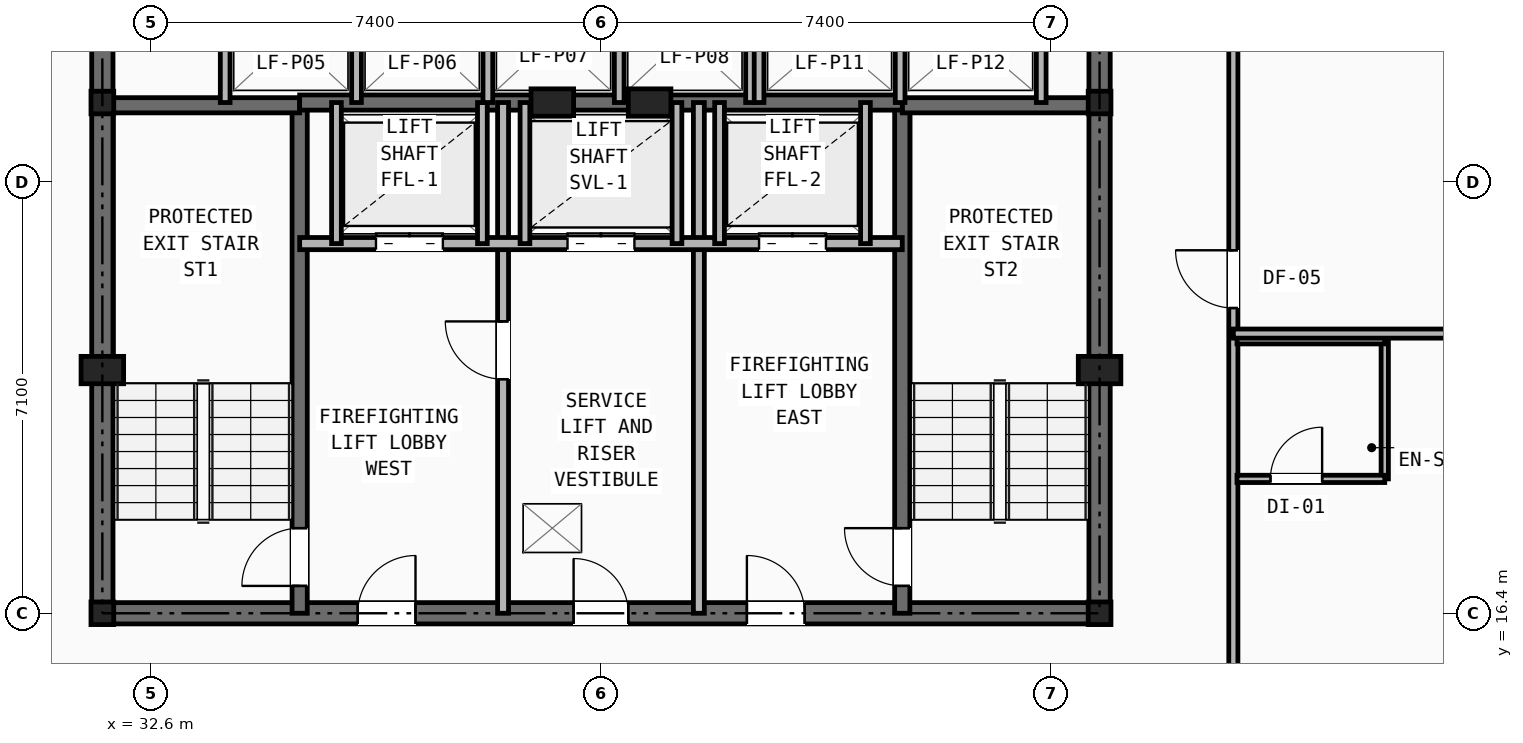
"""IFC4 building model, lengths in metres.
Left out: names, types, materials, properties, quantities, classifications, styles, units other than length and angle.
Written with IfcOpenShell. Run it as: python <this file> out.ifc"""

import sys

from ifc_helpers import new_model, si_unit, direction, frame, frame_2d, origin, origin_2d, place, context, subcontext, project, spatial, rectangle, i_section, extrude, element, fill, save


model = new_model("IFC4")
c1 = context("Model", 3, precision=1e-05, world=origin(), true_north=direction((0.0, 1.0)))
c2 = subcontext(c1, "Body", "Model", "MODEL_VIEW")
j1 = project(units=[si_unit("LENGTHUNIT", "METRE"), si_unit("PLANEANGLEUNIT", "RADIAN")], contexts=[c1])
p1 = place(None, origin())
s1 = spatial("IfcSite", under=j1, at=p1, CompositionType="ELEMENT")
p2 = place(p1, origin())
s2 = spatial("IfcBuilding", under=s1, at=p2, CompositionType="ELEMENT")
p3 = place(p2, frame((0.0, 0.0, 43.2)))
s3 = spatial("IfcBuildingStorey", under=s2, at=p3, CompositionType="ELEMENT", Elevation=43.2)
for number, where, z_axis, x_axis in (
    (1, (31.8, 16.4, 0.0), (0.0, 0.0, 1.0), (1.0, 0.0, 0.0)),
    (2, (48.2, 16.4, 0.0), (0.0, 0.0, 1.0), (1.0, 0.0, 0.0)),
    (3, (31.8, 24.8, 0.0), (0.0, 0.0, 1.0), (1.0, 0.0, 0.0)),
    (4, (48.2, 24.8, 0.0), (0.0, 0.0, 1.0), (1.0, 0.0, 0.0)),
):
    element("IfcColumn", number, at=place(p3, frame(where, z_axis=z_axis, x_axis=x_axis)), inside=s3, PredefinedType="COLUMN", context=c2, shape_type="SweptSolid", body=[
        extrude(i_section(OverallWidth=0.374, OverallDepth=0.372, WebThickness=0.016, FlangeThickness=0.026, at=origin_2d()), origin(), (0.0, 0.0, 1.0), 3.2),
    ])
for number, where, z_axis, x_axis in (
    (5, (31.8, 20.4, 0.0), (0.0, 0.0, 1.0), (1.0, 0.0, 0.0)),
    (6, (48.2, 20.4, 0.0), (0.0, 0.0, 1.0), (1.0, 0.0, 0.0)),
    (7, (39.2, 24.8, 0.0), (0.0, 0.0, 1.0), (1.0, 0.0, 0.0)),
    (8, (40.8, 24.8, 0.0), (0.0, 0.0, 1.0), (1.0, 0.0, 0.0)),
):
    element("IfcColumn", number, at=place(p3, frame(where, z_axis=z_axis, x_axis=x_axis)), inside=s3, PredefinedType="PILASTER", context=c2, shape_type="SweptSolid", body=[
        extrude(rectangle(XDim=0.7, YDim=0.45, at=origin_2d()), origin(), (0.0, 0.0, 1.0), 3.2),
    ])
p4 = place(p3, frame((31.8, 16.4, 0.0), z_axis=(0.0, 0.0, 1.0), x_axis=(1.0, 0.0, 0.0)))
e9 = element("IfcWall", 9, at=p4, inside=s3, PredefinedType="SHEAR", context=c2, shape_type="SweptSolid", body=[
    extrude(rectangle(XDim=16.4, YDim=0.35, at=frame_2d((8.2, 0.0))), origin(), (0.0, 0.0, 1.0), 2.98),
])
p5 = place(p4, frame((7.75, 0.0, 0.0)))
e10 = element("IfcOpeningElement", 10, at=p5, cuts=e9, PredefinedType="OPENING", context=c2, shape_type="SweptSolid", body=[
    extrude(rectangle(XDim=0.9, YDim=2.1, at=frame_2d((0.45, 1.05))), frame((0.0, 0.185, 0.0), z_axis=(0.0, -1.0, 0.0), x_axis=(1.0, 0.0, 0.0)), (0.0, 0.0, 1.0), 0.37),
])
p6 = place(p4, frame((4.2, 0.0, 0.0)))
e11 = element("IfcOpeningElement", 11, at=p6, cuts=e9, PredefinedType="OPENING", context=c2, shape_type="SweptSolid", body=[
    extrude(rectangle(XDim=0.95, YDim=2.1, at=frame_2d((0.475, 1.05))), frame((0.0, 0.185, 0.0), z_axis=(0.0, -1.0, 0.0), x_axis=(1.0, 0.0, 0.0)), (0.0, 0.0, 1.0), 0.37),
])
p7 = place(p4, frame((10.6, 0.0, 0.0)))
e12 = element("IfcOpeningElement", 12, at=p7, cuts=e9, PredefinedType="OPENING", context=c2, shape_type="SweptSolid", body=[
    extrude(rectangle(XDim=0.95, YDim=2.1, at=frame_2d((0.475, 1.05))), frame((0.0, 0.185, 0.0), z_axis=(0.0, -1.0, 0.0), x_axis=(1.0, 0.0, 0.0)), (0.0, 0.0, 1.0), 0.37),
])
p8 = place(p3, frame((31.8, 16.4, 0.0), z_axis=(0.0, 0.0, 1.0), x_axis=(0.0, 1.0, 0.0)))
e13 = element("IfcWall", 13, at=p8, inside=s3, PredefinedType="SHEAR", context=c2, shape_type="SweptSolid", body=[
    extrude(rectangle(XDim=14.8, YDim=0.35, at=frame_2d((7.4, 0.0))), origin(), (0.0, 0.0, 1.0), 2.98),
])
p9 = place(p8, frame((11.0, 0.0, 0.0)))
e14 = element("IfcOpeningElement", 14, at=p9, cuts=e13, PredefinedType="OPENING", context=c2, shape_type="SweptSolid", body=[
    extrude(rectangle(XDim=1.1, YDim=2.15, at=frame_2d((0.55, 1.075))), frame((0.0, 0.185, 0.0), z_axis=(0.0, -1.0, 0.0), x_axis=(1.0, 0.0, 0.0)), (0.0, 0.0, 1.0), 0.37),
])
p10 = place(p3, frame((48.2, 16.4, 0.0), z_axis=(0.0, 0.0, 1.0), x_axis=(0.0, 1.0, 0.0)))
e15 = element("IfcWall", 15, at=p10, inside=s3, PredefinedType="SHEAR", context=c2, shape_type="SweptSolid", body=[
    extrude(rectangle(XDim=14.8, YDim=0.35, at=frame_2d((7.4, 0.0))), origin(), (0.0, 0.0, 1.0), 2.98),
])
p11 = place(p10, frame((11.0, 0.0, 0.0)))
e16 = element("IfcOpeningElement", 16, at=p11, cuts=e15, PredefinedType="OPENING", context=c2, shape_type="SweptSolid", body=[
    extrude(rectangle(XDim=1.1, YDim=2.15, at=frame_2d((0.55, 1.075))), frame((0.0, 0.185, 0.0), z_axis=(0.0, -1.0, 0.0), x_axis=(1.0, 0.0, 0.0)), (0.0, 0.0, 1.0), 0.37),
])
p12 = place(p3, frame((35.045, 16.4, 0.0), z_axis=(0.0, 0.0, 1.0), x_axis=(0.0, 1.0, 0.0)))
e17 = element("IfcWall", 17, at=p12, inside=s3, PredefinedType="SHEAR", context=c2, shape_type="SweptSolid", body=[
    extrude(rectangle(XDim=8.4, YDim=0.25, at=frame_2d((4.2, 0.0))), origin(), (0.0, 0.0, 1.0), 2.98),
])
p13 = place(p12, frame((0.45, 0.0, 0.0)))
e18 = element("IfcOpeningElement", 18, at=p13, cuts=e17, PredefinedType="OPENING", context=c2, shape_type="SweptSolid", body=[
    extrude(rectangle(XDim=0.95, YDim=2.1, at=frame_2d((0.475, 1.05))), frame((0.0, 0.135, 0.0), z_axis=(0.0, -1.0, 0.0), x_axis=(1.0, 0.0, 0.0)), (0.0, 0.0, 1.0), 0.27),
])
p14 = place(p3, frame((31.8, 24.755, 0.0), z_axis=(0.0, 0.0, 1.0), x_axis=(1.0, 0.0, 0.0)))
e19 = element("IfcWall", 19, at=p14, inside=s3, PredefinedType="SHEAR", context=c2, shape_type="SweptSolid", body=[
    extrude(rectangle(XDim=3.245, YDim=0.25, at=frame_2d((1.623, 0.0))), origin(), (0.0, 0.0, 1.0), 2.98),
])
p15 = place(p3, frame((44.955, 16.4, 0.0), z_axis=(0.0, 0.0, 1.0), x_axis=(0.0, 1.0, 0.0)))
e20 = element("IfcWall", 20, at=p15, inside=s3, PredefinedType="SHEAR", context=c2, shape_type="SweptSolid", body=[
    extrude(rectangle(XDim=8.4, YDim=0.25, at=frame_2d((4.2, 0.0))), origin(), (0.0, 0.0, 1.0), 2.98),
])
p16 = place(p15, frame((0.45, 0.0, 0.0)))
e21 = element("IfcOpeningElement", 21, at=p16, cuts=e20, PredefinedType="OPENING", context=c2, shape_type="SweptSolid", body=[
    extrude(rectangle(XDim=0.95, YDim=2.1, at=frame_2d((0.475, 1.05))), frame((0.0, 0.135, 0.0), z_axis=(0.0, -1.0, 0.0), x_axis=(1.0, 0.0, 0.0)), (0.0, 0.0, 1.0), 0.27),
])
p17 = place(p3, frame((44.955, 24.755, 0.0), z_axis=(0.0, 0.0, 1.0), x_axis=(1.0, 0.0, 0.0)))
e22 = element("IfcWall", 22, at=p17, inside=s3, PredefinedType="SHEAR", context=c2, shape_type="SweptSolid", body=[
    extrude(rectangle(XDim=3.245, YDim=0.25, at=frame_2d((1.623, 0.0))), origin(), (0.0, 0.0, 1.0), 2.98),
])
p18 = place(p3, frame((35.045, 24.8, 0.0), z_axis=(0.0, 0.0, 1.0), x_axis=(1.0, 0.0, 0.0)))
e23 = element("IfcWall", 23, at=p18, inside=s3, PredefinedType="SHEAR", context=c2, shape_type="SweptSolid", body=[
    extrude(rectangle(XDim=9.91, YDim=0.25, at=frame_2d((4.955, 0.0))), origin(), (0.0, 0.0, 1.0), 2.98),
])
p19 = place(p3, frame((38.39, 16.4, 0.0), z_axis=(0.0, 0.0, 1.0), x_axis=(0.0, 1.0, 0.0)))
e24 = element("IfcWall", 24, at=p19, inside=s3, PredefinedType="PARTITIONING", context=c2, shape_type="SweptSolid", body=[
    extrude(rectangle(XDim=8.4, YDim=0.18, at=frame_2d((4.2, 0.0))), origin(), (0.0, 0.0, 1.0), 2.431),
])
p20 = place(p19, frame((3.85, 0.0, 0.0)))
e25 = element("IfcOpeningElement", 25, at=p20, cuts=e24, PredefinedType="OPENING", context=c2, shape_type="SweptSolid", body=[
    extrude(rectangle(XDim=0.95, YDim=2.1, at=frame_2d((0.475, 1.05))), frame((0.0, 0.1, 0.0), z_axis=(0.0, -1.0, 0.0), x_axis=(1.0, 0.0, 0.0)), (0.0, 0.0, 1.0), 0.2),
])
p21 = place(p3, frame((41.61, 16.4, 0.0), z_axis=(0.0, 0.0, 1.0), x_axis=(0.0, 1.0, 0.0)))
e26 = element("IfcWall", 26, at=p21, inside=s3, PredefinedType="PARTITIONING", context=c2, shape_type="SweptSolid", body=[
    extrude(rectangle(XDim=8.4, YDim=0.18, at=frame_2d((4.2, 0.0))), origin(), (0.0, 0.0, 1.0), 2.431),
])
p22 = place(p3, frame((35.045, 22.48, 0.0), z_axis=(0.0, 0.0, 1.0), x_axis=(1.0, 0.0, 0.0)))
e27 = element("IfcWall", 27, at=p22, inside=s3, PredefinedType="SOLIDWALL", context=c2, shape_type="SweptSolid", body=[
    extrude(rectangle(XDim=9.91, YDim=0.2, at=frame_2d((4.955, 0.0))), origin(), (0.0, 0.0, 1.0), 2.98),
])
p23 = place(p22, frame((1.255, 0.0, 0.0)))
e28 = element("IfcOpeningElement", 28, at=p23, cuts=e27, PredefinedType="OPENING", context=c2, shape_type="SweptSolid", body=[
    extrude(rectangle(XDim=1.1, YDim=2.15, at=frame_2d((0.55, 1.075))), frame((0.0, 0.11, 0.0), z_axis=(0.0, -1.0, 0.0), x_axis=(1.0, 0.0, 0.0)), (0.0, 0.0, 1.0), 0.22),
])
p24 = place(p22, frame((7.555, 0.0, 0.0)))
e29 = element("IfcOpeningElement", 29, at=p24, cuts=e27, PredefinedType="OPENING", context=c2, shape_type="SweptSolid", body=[
    extrude(rectangle(XDim=1.1, YDim=2.15, at=frame_2d((0.55, 1.075))), frame((0.0, 0.11, 0.0), z_axis=(0.0, -1.0, 0.0), x_axis=(1.0, 0.0, 0.0)), (0.0, 0.0, 1.0), 0.22),
])
p25 = place(p22, frame((4.405, 0.0, 0.0)))
e30 = element("IfcOpeningElement", 30, at=p25, cuts=e27, PredefinedType="OPENING", context=c2, shape_type="SweptSolid", body=[
    extrude(rectangle(XDim=1.1, YDim=2.15, at=frame_2d((0.55, 1.075))), frame((0.0, 0.11, 0.0), z_axis=(0.0, -1.0, 0.0), x_axis=(1.0, 0.0, 0.0)), (0.0, 0.0, 1.0), 0.22),
])
for number, where, z_axis, x_axis in (
    (31, (35.65, 22.48, 0.0), (0.0, 0.0, 1.0), (0.0, 1.0, 0.0)),
    (32, (38.05, 22.48, 0.0), (0.0, 0.0, 1.0), (0.0, 1.0, 0.0)),
    (33, (41.95, 22.48, 0.0), (0.0, 0.0, 1.0), (0.0, 1.0, 0.0)),
    (34, (44.35, 22.48, 0.0), (0.0, 0.0, 1.0), (0.0, 1.0, 0.0)),
    (35, (38.75, 22.48, 0.0), (0.0, 0.0, 1.0), (0.0, 1.0, 0.0)),
    (36, (41.25, 22.48, 0.0), (0.0, 0.0, 1.0), (0.0, 1.0, 0.0)),
):
    element("IfcWall", number, at=place(p3, frame(where, z_axis=z_axis, x_axis=x_axis)), inside=s3, PredefinedType="SOLIDWALL", context=c2, shape_type="SweptSolid", body=[
        extrude(rectangle(XDim=2.32, YDim=0.16, at=frame_2d((1.16, 0.0))), origin(), (0.0, 0.0, 1.0), 2.98),
    ])
for number, where, z_axis, x_axis in (
    (37, (33.82, 24.8, 0.0), (0.0, 0.0, 1.0), (0.0, 1.0, 0.0)),
    (38, (35.98, 24.8, 0.0), (0.0, 0.0, 1.0), (0.0, 1.0, 0.0)),
    (39, (38.14, 24.8, 0.0), (0.0, 0.0, 1.0), (0.0, 1.0, 0.0)),
    (40, (40.3, 24.8, 0.0), (0.0, 0.0, 1.0), (0.0, 1.0, 0.0)),
    (41, (42.46, 24.8, 0.0), (0.0, 0.0, 1.0), (0.0, 1.0, 0.0)),
    (42, (42.6, 24.8, 0.0), (0.0, 0.0, 1.0), (0.0, 1.0, 0.0)),
    (43, (44.92, 24.8, 0.0), (0.0, 0.0, 1.0), (0.0, 1.0, 0.0)),
    (44, (47.24, 24.8, 0.0), (0.0, 0.0, 1.0), (0.0, 1.0, 0.0)),
):
    element("IfcWall", number, at=place(p3, frame(where, z_axis=z_axis, x_axis=x_axis)), inside=s3, PredefinedType="SOLIDWALL", context=c2, shape_type="SweptSolid", body=[
        extrude(rectangle(XDim=2.08, YDim=0.16, at=frame_2d((1.04, 0.0))), origin(), (0.0, 0.0, 1.0), 2.98),
    ])
p26 = place(p3, frame((50.4, 14.1, 0.0), z_axis=(0.0, 0.0, 1.0), x_axis=(0.0, 1.0, 0.0)))
e45 = element("IfcWall", 45, at=p26, inside=s3, PredefinedType="PARTITIONING", context=c2, shape_type="SweptSolid", body=[
    extrude(rectangle(XDim=21.9, YDim=0.15, at=frame_2d((10.95, 0.0))), origin(), (0.0, 0.0, 1.0), 2.191),
])
p27 = place(p26, frame((0.42, 0.0, 0.0)))
e46 = element("IfcOpeningElement", 46, at=p27, cuts=e45, PredefinedType="OPENING", context=c2, shape_type="SweptSolid", body=[
    extrude(rectangle(XDim=0.95, YDim=2.1, at=frame_2d((0.475, 1.05))), frame((0.0, 0.085, 0.0), z_axis=(0.0, -1.0, 0.0), x_axis=(1.0, 0.0, 0.0)), (0.0, 0.0, 1.0), 0.17),
])
p28 = place(p26, frame((7.32, 0.0, 0.0)))
e47 = element("IfcOpeningElement", 47, at=p28, cuts=e45, PredefinedType="OPENING", context=c2, shape_type="SweptSolid", body=[
    extrude(rectangle(XDim=0.95, YDim=2.1, at=frame_2d((0.475, 1.05))), frame((0.0, 0.085, 0.0), z_axis=(0.0, -1.0, 0.0), x_axis=(1.0, 0.0, 0.0)), (0.0, 0.0, 1.0), 0.17),
])
p29 = place(p26, frame((15.82, 0.0, 0.0)))
e48 = element("IfcOpeningElement", 48, at=p29, cuts=e45, PredefinedType="OPENING", context=c2, shape_type="SweptSolid", body=[
    extrude(rectangle(XDim=0.95, YDim=2.1, at=frame_2d((0.475, 1.05))), frame((0.0, 0.085, 0.0), z_axis=(0.0, -1.0, 0.0), x_axis=(1.0, 0.0, 0.0)), (0.0, 0.0, 1.0), 0.17),
])
p30 = place(p3, frame((52.89, 18.61, 0.0), z_axis=(0.0, 0.0, 1.0), x_axis=(0.0, 1.0, 0.0)))
e49 = element("IfcWall", 49, at=p30, inside=s3, PredefinedType="PARTITIONING", context=c2, shape_type="SweptSolid", body=[
    extrude(rectangle(XDim=2.28, YDim=0.12, at=frame_2d((1.14, 0.0))), origin(), (0.0, 0.0, 1.0), 2.98),
])
p31 = place(p3, frame((50.46, 18.61, 0.0), z_axis=(0.0, 0.0, 1.0), x_axis=(1.0, 0.0, 0.0)))
e50 = element("IfcWall", 50, at=p31, inside=s3, PredefinedType="PARTITIONING", context=c2, shape_type="SweptSolid", body=[
    extrude(rectangle(XDim=2.43, YDim=0.12, at=frame_2d((1.215, 0.0))), origin(), (0.0, 0.0, 1.0), 2.98),
])
p32 = place(p31, frame((0.55, 0.0, 0.0)))
e51 = element("IfcOpeningElement", 51, at=p32, cuts=e50, PredefinedType="OPENING", context=c2, shape_type="SweptSolid", body=[
    extrude(rectangle(XDim=0.85, YDim=2.05, at=frame_2d((0.425, 1.025))), frame((0.0, 0.07, 0.0), z_axis=(0.0, -1.0, 0.0), x_axis=(1.0, 0.0, 0.0)), (0.0, 0.0, 1.0), 0.14),
])
p33 = place(p3, frame((50.46, 20.89, 0.0), z_axis=(0.0, 0.0, 1.0), x_axis=(1.0, 0.0, 0.0)))
e52 = element("IfcWall", 52, at=p33, inside=s3, PredefinedType="PARTITIONING", context=c2, shape_type="SweptSolid", body=[
    extrude(rectangle(XDim=2.43, YDim=0.12, at=frame_2d((1.215, 0.0))), origin(), (0.0, 0.0, 1.0), 2.98),
])
p34 = place(p3, frame((50.4, 21.0, 0.0), z_axis=(0.0, 0.0, 1.0), x_axis=(1.0, 0.0, 0.0)))
e53 = element("IfcWall", 53, at=p34, inside=s3, PredefinedType="PARTITIONING", context=c2, shape_type="SweptSolid", body=[
    extrude(rectangle(XDim=14.622, YDim=0.15, at=frame_2d((7.311, 0.0))), origin(), (0.0, 0.0, 1.0), 2.268),
])
p35 = place(p5, origin())
e54 = element("IfcDoor", 54, at=p35, inside=s3, OperationType="SINGLE_SWING_LEFT", PredefinedType="DOOR", context=c2, shape_type="SweptSolid", body=[
    extrude(rectangle(XDim=0.9, YDim=2.1, at=frame_2d((0.45, 1.05))), frame((0.0, 0.025, 0.0), z_axis=(0.0, -1.0, 0.0), x_axis=(1.0, 0.0, 0.0)), (0.0, 0.0, 1.0), 0.05),
])
fill(e10, e54)
p36 = place(p20, origin())
e55 = element("IfcDoor", 55, at=p36, inside=s3, OperationType="SINGLE_SWING_RIGHT", PredefinedType="DOOR", context=c2, shape_type="SweptSolid", body=[
    extrude(rectangle(XDim=0.95, YDim=2.1, at=frame_2d((0.475, 1.05))), frame((0.0, 0.025, 0.0), z_axis=(0.0, -1.0, 0.0), x_axis=(1.0, 0.0, 0.0)), (0.0, 0.0, 1.0), 0.05),
])
fill(e25, e55)
p37 = place(p13, origin())
e56 = element("IfcDoor", 56, at=p37, inside=s3, OperationType="SINGLE_SWING_LEFT", PredefinedType="DOOR", context=c2, shape_type="SweptSolid", body=[
    extrude(rectangle(XDim=0.95, YDim=2.1, at=frame_2d((0.475, 1.05))), frame((0.0, 0.025, 0.0), z_axis=(0.0, -1.0, 0.0), x_axis=(1.0, 0.0, 0.0)), (0.0, 0.0, 1.0), 0.05),
])
fill(e18, e56)
p38 = place(p16, origin())
e57 = element("IfcDoor", 57, at=p38, inside=s3, OperationType="SINGLE_SWING_RIGHT", PredefinedType="DOOR", context=c2, shape_type="SweptSolid", body=[
    extrude(rectangle(XDim=0.95, YDim=2.1, at=frame_2d((0.475, 1.05))), frame((0.0, 0.025, 0.0), z_axis=(0.0, -1.0, 0.0), x_axis=(1.0, 0.0, 0.0)), (0.0, 0.0, 1.0), 0.05),
])
fill(e21, e57)
p39 = place(p6, origin())
e58 = element("IfcDoor", 58, at=p39, inside=s3, OperationType="SINGLE_SWING_RIGHT", PredefinedType="DOOR", context=c2, shape_type="SweptSolid", body=[
    extrude(rectangle(XDim=0.95, YDim=2.1, at=frame_2d((0.475, 1.05))), frame((0.0, 0.025, 0.0), z_axis=(0.0, -1.0, 0.0), x_axis=(1.0, 0.0, 0.0)), (0.0, 0.0, 1.0), 0.05),
])
fill(e11, e58)
p40 = place(p7, origin())
e59 = element("IfcDoor", 59, at=p40, inside=s3, OperationType="SINGLE_SWING_LEFT", PredefinedType="DOOR", context=c2, shape_type="SweptSolid", body=[
    extrude(rectangle(XDim=0.95, YDim=2.1, at=frame_2d((0.475, 1.05))), frame((0.0, 0.025, 0.0), z_axis=(0.0, -1.0, 0.0), x_axis=(1.0, 0.0, 0.0)), (0.0, 0.0, 1.0), 0.05),
])
fill(e12, e59)
p41 = place(p23, origin())
e60 = element("IfcDoor", 60, at=p41, inside=s3, OperationType="DOUBLE_DOOR_SLIDING", PredefinedType="DOOR", context=c2, shape_type="SweptSolid", body=[
    extrude(rectangle(XDim=1.1, YDim=2.15, at=frame_2d((0.55, 1.075))), frame((0.0, 0.025, 0.0), z_axis=(0.0, -1.0, 0.0), x_axis=(1.0, 0.0, 0.0)), (0.0, 0.0, 1.0), 0.05),
])
fill(e28, e60)
p42 = place(p24, origin())
e61 = element("IfcDoor", 61, at=p42, inside=s3, OperationType="DOUBLE_DOOR_SLIDING", PredefinedType="DOOR", context=c2, shape_type="SweptSolid", body=[
    extrude(rectangle(XDim=1.1, YDim=2.15, at=frame_2d((0.55, 1.075))), frame((0.0, 0.025, 0.0), z_axis=(0.0, -1.0, 0.0), x_axis=(1.0, 0.0, 0.0)), (0.0, 0.0, 1.0), 0.05),
])
fill(e29, e61)
p43 = place(p25, origin())
e62 = element("IfcDoor", 62, at=p43, inside=s3, OperationType="DOUBLE_DOOR_SLIDING", PredefinedType="DOOR", context=c2, shape_type="SweptSolid", body=[
    extrude(rectangle(XDim=1.1, YDim=2.15, at=frame_2d((0.55, 1.075))), frame((0.0, 0.025, 0.0), z_axis=(0.0, -1.0, 0.0), x_axis=(1.0, 0.0, 0.0)), (0.0, 0.0, 1.0), 0.05),
])
fill(e30, e62)
p44 = place(p32, origin())
e63 = element("IfcDoor", 63, at=p44, inside=s3, OperationType="SINGLE_SWING_RIGHT", PredefinedType="DOOR", context=c2, shape_type="SweptSolid", body=[
    extrude(rectangle(XDim=0.85, YDim=2.05, at=frame_2d((0.425, 1.025))), frame((0.0, 0.025, 0.0), z_axis=(0.0, -1.0, 0.0), x_axis=(1.0, 0.0, 0.0)), (0.0, 0.0, 1.0), 0.05),
])
fill(e51, e63)
p45 = place(p28, origin())
e64 = element("IfcDoor", 64, at=p45, inside=s3, OperationType="SINGLE_SWING_RIGHT", PredefinedType="DOOR", context=c2, shape_type="SweptSolid", body=[
    extrude(rectangle(XDim=0.95, YDim=2.1, at=frame_2d((0.475, 1.05))), frame((0.0, 0.025, 0.0), z_axis=(0.0, -1.0, 0.0), x_axis=(1.0, 0.0, 0.0)), (0.0, 0.0, 1.0), 0.05),
])
fill(e47, e64)
save(model, sys.argv[1])
